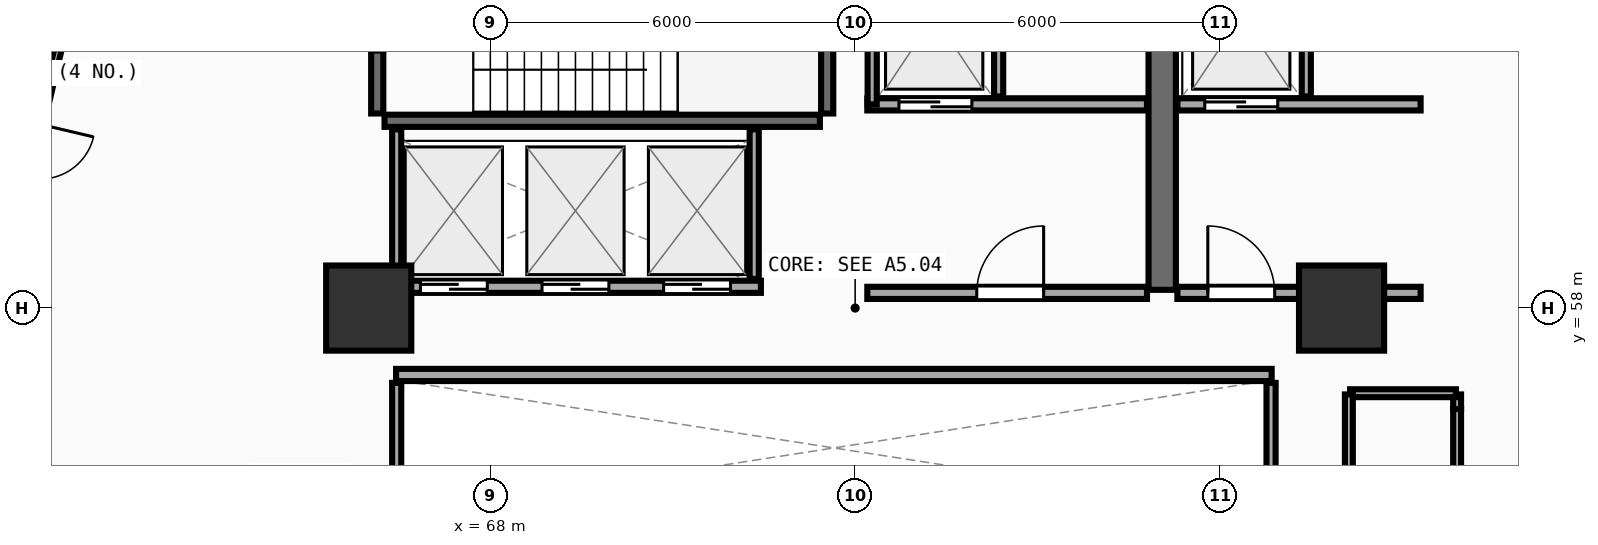
"""IFC4 building model, lengths in metres.
Left out: names, types, materials, properties, quantities, classifications, styles, units other than length and angle.
Written with IfcOpenShell. Run it as: python <this file> out.ifc"""

import sys

from ifc_helpers import new_model, si_unit, direction, frame, frame_2d, origin, origin_2d, place, context, subcontext, project, spatial, rectangle, extrude, element, fill, save


model = new_model("IFC4")
c1 = context("Model", 3, precision=1e-05, world=origin(), true_north=direction((0.0, 1.0)))
c2 = subcontext(c1, "Body", "Model", "MODEL_VIEW")
j1 = project(units=[si_unit("LENGTHUNIT", "METRE"), si_unit("PLANEANGLEUNIT", "RADIAN")], contexts=[c1])
p1 = place(None, origin())
s1 = spatial("IfcSite", under=j1, at=p1, CompositionType="ELEMENT")
p2 = place(p1, origin())
s2 = spatial("IfcBuilding", under=s1, at=p2, CompositionType="ELEMENT")
p3 = place(p2, frame((0.0, 0.0, 18.0)))
s3 = spatial("IfcBuildingStorey", under=s2, at=p3, CompositionType="ELEMENT", Elevation=18.0)
for number, where, z_axis, x_axis in (
    (1, (82.0, 58.0, 0.0), (0.0, 0.0, 1.0), (1.0, 0.0, 0.0)),
    (2, (66.0, 58.0, 0.0), (0.0, 0.0, 1.0), (1.0, 0.0, 0.0)),
):
    element("IfcColumn", number, at=place(p3, frame(where, z_axis=z_axis, x_axis=x_axis)), inside=s3, PredefinedType="PILASTER", context=c2, shape_type="SweptSolid", body=[
        extrude(rectangle(XDim=1.4, YDim=1.4, at=origin_2d()), origin(), (0.0, 0.0, 1.0), 4.5),
    ])
p4 = place(p3, frame((66.26, 61.08, 0.0), z_axis=(0.0, 0.0, 1.0), x_axis=(1.0, 0.0, 0.0)))
e3 = element("IfcWall", 3, at=p4, inside=s3, PredefinedType="SHEAR", context=c2, shape_type="SweptSolid", body=[
    extrude(rectangle(XDim=7.16, YDim=0.2, at=frame_2d((3.58, 0.0))), origin(), (0.0, 0.0, 1.0), 4.24),
])
p5 = place(p3, frame((73.54, 61.2, 0.0), z_axis=(0.0, 0.0, 1.0), x_axis=(0.0, 1.0, 0.0)))
e4 = element("IfcWall", 4, at=p5, inside=s3, PredefinedType="SHEAR", context=c2, shape_type="SweptSolid", body=[
    extrude(rectangle(XDim=3.07, YDim=0.2, at=frame_2d((1.535, 0.0))), origin(), (0.0, 0.0, 1.0), 4.24),
])
p6 = place(p3, frame((66.14, 64.27, 0.0), z_axis=(0.0, 0.0, 1.0), x_axis=(0.0, -1.0, 0.0)))
e5 = element("IfcWall", 5, at=p6, inside=s3, PredefinedType="SHEAR", context=c2, shape_type="SweptSolid", body=[
    extrude(rectangle(XDim=3.07, YDim=0.2, at=frame_2d((1.535, 0.0))), origin(), (0.0, 0.0, 1.0), 4.24),
])
p7 = place(p6, frame((1.01, 0.0, 0.0)))
e6 = element("IfcOpeningElement", 6, at=p7, cuts=e5, PredefinedType="OPENING", context=c2, shape_type="SweptSolid", body=[
    extrude(rectangle(XDim=1.05, YDim=2.1, at=frame_2d((0.525, 1.05))), frame((0.0, 0.11, 0.0), z_axis=(0.0, -1.0, 0.0), x_axis=(1.0, 0.0, 0.0)), (0.0, 0.0, 1.0), 0.22),
])
p8 = place(p3, frame((79.05, 58.3, 0.0), z_axis=(0.0, 0.0, 1.0), x_axis=(0.0, 1.0, 0.0)))
e7 = element("IfcWall", 7, at=p8, inside=s3, PredefinedType="SHEAR", context=c2, shape_type="SweptSolid", body=[
    extrude(rectangle(XDim=6.3, YDim=0.45, at=frame_2d((3.15, 0.0))), origin(), (0.0, 0.0, 1.0), 4.24),
])
p9 = place(p3, frame((74.2, 61.35, 0.0), z_axis=(0.0, 0.0, 1.0), x_axis=(1.0, 0.0, 0.0)))
e8 = element("IfcWall", 8, at=p9, inside=s3, PredefinedType="SOLIDWALL", context=c2, shape_type="SweptSolid", body=[
    extrude(rectangle(XDim=4.6, YDim=0.2, at=frame_2d((2.3, 0.0))), origin(), (0.0, 0.0, 1.0), 4.23),
])
p10 = place(p9, frame((0.52, 0.0, 0.0)))
e9 = element("IfcOpeningElement", 9, at=p10, cuts=e8, PredefinedType="OPENING", context=c2, shape_type="SweptSolid", body=[
    extrude(rectangle(XDim=1.2, YDim=2.15, at=frame_2d((0.6, 1.075))), frame((0.0, 0.11, 0.0), z_axis=(0.0, -1.0, 0.0), x_axis=(1.0, 0.0, 0.0)), (0.0, 0.0, 1.0), 0.22),
])
p11 = place(p3, frame((74.28, 61.35, 0.0), z_axis=(0.0, 0.0, 1.0), x_axis=(0.0, 1.0, 0.0)))
e10 = element("IfcWall", 10, at=p11, inside=s3, PredefinedType="PARTITIONING", context=c2, shape_type="SweptSolid", body=[
    extrude(rectangle(XDim=2.97, YDim=0.15, at=frame_2d((1.485, 0.0))), origin(), (0.0, 0.0, 1.0), 4.23),
])
p12 = place(p3, frame((76.36, 61.48, 0.0), z_axis=(0.0, 0.0, 1.0), x_axis=(0.0, 1.0, 0.0)))
e11 = element("IfcWall", 11, at=p12, inside=s3, PredefinedType="PARTITIONING", context=c2, shape_type="SweptSolid", body=[
    extrude(rectangle(XDim=2.84, YDim=0.15, at=frame_2d((1.42, 0.0))), origin(), (0.0, 0.0, 1.0), 4.23),
])
p13 = place(p3, frame((79.3, 61.35, 0.0), z_axis=(0.0, 0.0, 1.0), x_axis=(1.0, 0.0, 0.0)))
e12 = element("IfcWall", 12, at=p13, inside=s3, PredefinedType="SOLIDWALL", context=c2, shape_type="SweptSolid", body=[
    extrude(rectangle(XDim=4.0, YDim=0.2, at=frame_2d((2.0, 0.0))), origin(), (0.0, 0.0, 1.0), 3.525),
])
p14 = place(p13, frame((0.45, 0.0, 0.0)))
e13 = element("IfcOpeningElement", 13, at=p14, cuts=e12, PredefinedType="OPENING", context=c2, shape_type="SweptSolid", body=[
    extrude(rectangle(XDim=1.2, YDim=2.15, at=frame_2d((0.6, 1.075))), frame((0.0, 0.11, 0.0), z_axis=(0.0, -1.0, 0.0), x_axis=(1.0, 0.0, 0.0)), (0.0, 0.0, 1.0), 0.22),
])
p15 = place(p3, frame((81.42, 61.48, 0.0), z_axis=(0.0, 0.0, 1.0), x_axis=(0.0, 1.0, 0.0)))
e14 = element("IfcWall", 14, at=p15, inside=s3, PredefinedType="PARTITIONING", context=c2, shape_type="SweptSolid", body=[
    extrude(rectangle(XDim=2.84, YDim=0.15, at=frame_2d((1.42, 0.0))), origin(), (0.0, 0.0, 1.0), 4.23),
])
p16 = place(p3, frame((74.2, 58.25, 0.0), z_axis=(0.0, 0.0, 1.0), x_axis=(1.0, 0.0, 0.0)))
e15 = element("IfcWall", 15, at=p16, inside=s3, PredefinedType="SOLIDWALL", context=c2, shape_type="SweptSolid", body=[
    extrude(rectangle(XDim=4.6, YDim=0.2, at=frame_2d((2.3, 0.0))), origin(), (0.0, 0.0, 1.0), 4.23),
])
p17 = place(p16, frame((1.8, 0.0, 0.0)))
e16 = element("IfcOpeningElement", 16, at=p17, cuts=e15, PredefinedType="OPENING", context=c2, shape_type="SweptSolid", body=[
    extrude(rectangle(XDim=1.1, YDim=2.1, at=frame_2d((0.55, 1.05))), frame((0.0, 0.11, 0.0), z_axis=(0.0, -1.0, 0.0), x_axis=(1.0, 0.0, 0.0)), (0.0, 0.0, 1.0), 0.22),
])
p18 = place(p3, frame((79.3, 58.25, 0.0), z_axis=(0.0, 0.0, 1.0), x_axis=(1.0, 0.0, 0.0)))
e17 = element("IfcWall", 17, at=p18, inside=s3, PredefinedType="SOLIDWALL", context=c2, shape_type="SweptSolid", body=[
    extrude(rectangle(XDim=4.0, YDim=0.2, at=frame_2d((2.0, 0.0))), origin(), (0.0, 0.0, 1.0), 3.525),
])
p19 = place(p18, frame((0.5, 0.0, 0.0)))
e18 = element("IfcOpeningElement", 18, at=p19, cuts=e17, PredefinedType="OPENING", context=c2, shape_type="SweptSolid", body=[
    extrude(rectangle(XDim=1.1, YDim=2.1, at=frame_2d((0.55, 1.05))), frame((0.0, 0.11, 0.0), z_axis=(0.0, -1.0, 0.0), x_axis=(1.0, 0.0, 0.0)), (0.0, 0.0, 1.0), 0.22),
])
p20 = place(p3, frame((66.45, 58.35, 0.0), z_axis=(0.0, 0.0, 1.0), x_axis=(1.0, 0.0, 0.0)))
e19 = element("IfcWall", 19, at=p20, inside=s3, PredefinedType="SOLIDWALL", context=c2, shape_type="SweptSolid", body=[
    extrude(rectangle(XDim=6.0, YDim=0.2, at=frame_2d((3.0, 0.0))), origin(), (0.0, 0.0, 1.0), 4.23),
])
p21 = place(p20, frame((0.4, 0.0, 0.0)))
e20 = element("IfcOpeningElement", 20, at=p21, cuts=e19, PredefinedType="OPENING", context=c2, shape_type="SweptSolid", body=[
    extrude(rectangle(XDim=1.1, YDim=2.1, at=frame_2d((0.55, 1.05))), frame((0.0, 0.11, 0.0), z_axis=(0.0, -1.0, 0.0), x_axis=(1.0, 0.0, 0.0)), (0.0, 0.0, 1.0), 0.22),
])
p22 = place(p20, frame((2.4, 0.0, 0.0)))
e21 = element("IfcOpeningElement", 21, at=p22, cuts=e19, PredefinedType="OPENING", context=c2, shape_type="SweptSolid", body=[
    extrude(rectangle(XDim=1.1, YDim=2.1, at=frame_2d((0.55, 1.05))), frame((0.0, 0.11, 0.0), z_axis=(0.0, -1.0, 0.0), x_axis=(1.0, 0.0, 0.0)), (0.0, 0.0, 1.0), 0.22),
])
p23 = place(p20, frame((4.4, 0.0, 0.0)))
e22 = element("IfcOpeningElement", 22, at=p23, cuts=e19, PredefinedType="OPENING", context=c2, shape_type="SweptSolid", body=[
    extrude(rectangle(XDim=1.1, YDim=2.1, at=frame_2d((0.55, 1.05))), frame((0.0, 0.11, 0.0), z_axis=(0.0, -1.0, 0.0), x_axis=(1.0, 0.0, 0.0)), (0.0, 0.0, 1.0), 0.22),
])
for number, where, z_axis, x_axis in (
    (23, (66.46, 58.48, 0.0), (0.0, 0.0, 1.0), (0.0, 1.0, 0.0)),
    (24, (72.34, 58.48, 0.0), (0.0, 0.0, 1.0), (0.0, 1.0, 0.0)),
):
    element("IfcWall", number, at=place(p3, frame(where, z_axis=z_axis, x_axis=x_axis)), inside=s3, PredefinedType="PARTITIONING", context=c2, shape_type="SweptSolid", body=[
        extrude(rectangle(XDim=2.46, YDim=0.15, at=frame_2d((1.23, 0.0))), origin(), (0.0, 0.0, 1.0), 4.23),
    ])
p24 = place(p3, frame((66.45, 56.9, 0.0), z_axis=(0.0, 0.0, 1.0), x_axis=(1.0, 0.0, 0.0)))
e25 = element("IfcWall", 25, at=p24, inside=s3, PredefinedType="SOLIDWALL", context=c2, shape_type="SweptSolid", body=[
    extrude(rectangle(XDim=14.4, YDim=0.2, at=frame_2d((7.2, 0.0))), origin(), (0.0, 0.0, 1.0), 4.23),
])
for number, where, z_axis, x_axis in (
    (26, (66.46, 54.48, 0.0), (0.0, 0.0, 1.0), (0.0, 1.0, 0.0)),
    (27, (80.84, 54.48, 0.0), (0.0, 0.0, 1.0), (0.0, 1.0, 0.0)),
):
    element("IfcWall", number, at=place(p3, frame(where, z_axis=z_axis, x_axis=x_axis)), inside=s3, PredefinedType="PARTITIONING", context=c2, shape_type="SweptSolid", body=[
        extrude(rectangle(XDim=2.29, YDim=0.15, at=frame_2d((1.145, 0.0))), origin(), (0.0, 0.0, 1.0), 4.23),
    ])
p25 = place(p3, frame((83.9, 52.46, 0.0), z_axis=(0.0, 0.0, 1.0), x_axis=(0.0, 1.0, 0.0)))
e28 = element("IfcWall", 28, at=p25, inside=s3, PredefinedType="PLUMBINGWALL", context=c2, shape_type="SweptSolid", body=[
    extrude(rectangle(XDim=3.88, YDim=0.13, at=frame_2d((1.94, 0.0))), origin(), (0.0, 0.0, 1.0), 4.23),
])
p26 = place(p25, frame((1.51, 0.0, 0.0)))
e29 = element("IfcOpeningElement", 29, at=p26, cuts=e28, PredefinedType="OPENING", context=c2, shape_type="SweptSolid", body=[
    extrude(rectangle(XDim=0.86, YDim=2.05, at=frame_2d((0.43, 1.025))), frame((0.0, 0.075, 0.0), z_axis=(0.0, -1.0, 0.0), x_axis=(1.0, 0.0, 0.0)), (0.0, 0.0, 1.0), 0.15),
])
p27 = place(p3, frame((60.987, 62.67, 0.0), z_axis=(0.0, 0.0, 1.0), x_axis=(-0.229728237891, -0.973254815922, 0.0)))
e30 = element("IfcWall", 30, at=p27, inside=s3, PredefinedType="PARTITIONING", context=c2, shape_type="SweptSolid", body=[
    extrude(rectangle(XDim=4.286, YDim=0.12, at=frame_2d((2.143, 0.0))), origin(), (0.0, 0.0, 1.0), 4.23),
])
p28 = place(p27, frame((1.693, 0.0, 0.0)))
e31 = element("IfcOpeningElement", 31, at=p28, cuts=e30, PredefinedType="OPENING", context=c2, shape_type="SweptSolid", body=[
    extrude(rectangle(XDim=0.9, YDim=2.08, at=frame_2d((0.45, 1.04))), frame((0.0, 0.07, 0.0), z_axis=(0.0, -1.0, 0.0), x_axis=(1.0, 0.0, 0.0)), (0.0, 0.0, 1.0), 0.14),
])
p29 = place(p3, frame((83.9, 56.34, 0.0), z_axis=(0.0, 0.0, 1.0), x_axis=(0.0, 1.0, 0.0)))
e32 = element("IfcWall", 32, at=p29, inside=s3, PredefinedType="PLUMBINGWALL", context=c2, shape_type="SweptSolid", body=[
    extrude(rectangle(XDim=0.24, YDim=0.13, at=frame_2d((0.12, 0.0))), origin(), (0.0, 0.0, 1.0), 4.23),
])
p30 = place(p3, frame((83.88, 56.6, 0.0), z_axis=(0.0, 0.0, 1.0), x_axis=(-1.0, 0.0, 0.0)))
e33 = element("IfcWall", 33, at=p30, inside=s3, PredefinedType="PLUMBINGWALL", context=c2, shape_type="SweptSolid", body=[
    extrude(rectangle(XDim=1.74, YDim=0.13, at=frame_2d((0.87, 0.0))), origin(), (0.0, 0.0, 1.0), 3.525),
])
p31 = place(p3, frame((82.12, 56.58, 0.0), z_axis=(0.0, 0.0, 1.0), x_axis=(0.0, -1.0, 0.0)))
e34 = element("IfcWall", 34, at=p31, inside=s3, PredefinedType="PLUMBINGWALL", context=c2, shape_type="SweptSolid", body=[
    extrude(rectangle(XDim=2.31, YDim=0.13, at=frame_2d((1.155, 0.0))), origin(), (0.0, 0.0, 1.0), 3.525),
])
p32 = place(p10, origin())
e35 = element("IfcDoor", 35, at=p32, inside=s3, OperationType="DOUBLE_DOOR_SLIDING", PredefinedType="DOOR", context=c2, shape_type="SweptSolid", body=[
    extrude(rectangle(XDim=1.2, YDim=2.15, at=frame_2d((0.6, 1.075))), frame((0.0, 0.025, 0.0), z_axis=(0.0, -1.0, 0.0), x_axis=(1.0, 0.0, 0.0)), (0.0, 0.0, 1.0), 0.05),
])
fill(e9, e35)
p33 = place(p14, origin())
e36 = element("IfcDoor", 36, at=p33, inside=s3, OperationType="DOUBLE_DOOR_SLIDING", PredefinedType="DOOR", context=c2, shape_type="SweptSolid", body=[
    extrude(rectangle(XDim=1.2, YDim=2.15, at=frame_2d((0.6, 1.075))), frame((0.0, 0.025, 0.0), z_axis=(0.0, -1.0, 0.0), x_axis=(1.0, 0.0, 0.0)), (0.0, 0.0, 1.0), 0.05),
])
fill(e13, e36)
p34 = place(p17, frame((1.1, 0.0, 0.0), z_axis=(0.0, 0.0, 1.0), x_axis=(-1.0, 0.0, 0.0)))
e37 = element("IfcDoor", 37, at=p34, inside=s3, OperationType="SINGLE_SWING_LEFT", PredefinedType="DOOR", context=c2, shape_type="SweptSolid", body=[
    extrude(rectangle(XDim=1.1, YDim=2.1, at=frame_2d((0.55, 1.05))), frame((0.0, 0.025, 0.0), z_axis=(0.0, -1.0, 0.0), x_axis=(1.0, 0.0, 0.0)), (0.0, 0.0, 1.0), 0.05),
])
fill(e16, e37)
p35 = place(p19, frame((1.1, 0.0, 0.0), z_axis=(0.0, 0.0, 1.0), x_axis=(-1.0, 0.0, 0.0)))
e38 = element("IfcDoor", 38, at=p35, inside=s3, OperationType="SINGLE_SWING_RIGHT", PredefinedType="DOOR", context=c2, shape_type="SweptSolid", body=[
    extrude(rectangle(XDim=1.1, YDim=2.1, at=frame_2d((0.55, 1.05))), frame((0.0, 0.025, 0.0), z_axis=(0.0, -1.0, 0.0), x_axis=(1.0, 0.0, 0.0)), (0.0, 0.0, 1.0), 0.05),
])
fill(e18, e38)
p36 = place(p21, origin())
e39 = element("IfcDoor", 39, at=p36, inside=s3, OperationType="DOUBLE_DOOR_SLIDING", PredefinedType="DOOR", context=c2, shape_type="SweptSolid", body=[
    extrude(rectangle(XDim=1.1, YDim=2.1, at=frame_2d((0.55, 1.05))), frame((0.0, 0.025, 0.0), z_axis=(0.0, -1.0, 0.0), x_axis=(1.0, 0.0, 0.0)), (0.0, 0.0, 1.0), 0.05),
])
fill(e20, e39)
p37 = place(p22, origin())
e40 = element("IfcDoor", 40, at=p37, inside=s3, OperationType="DOUBLE_DOOR_SLIDING", PredefinedType="DOOR", context=c2, shape_type="SweptSolid", body=[
    extrude(rectangle(XDim=1.1, YDim=2.1, at=frame_2d((0.55, 1.05))), frame((0.0, 0.025, 0.0), z_axis=(0.0, -1.0, 0.0), x_axis=(1.0, 0.0, 0.0)), (0.0, 0.0, 1.0), 0.05),
])
fill(e21, e40)
p38 = place(p23, origin())
e41 = element("IfcDoor", 41, at=p38, inside=s3, OperationType="DOUBLE_DOOR_SLIDING", PredefinedType="DOOR", context=c2, shape_type="SweptSolid", body=[
    extrude(rectangle(XDim=1.1, YDim=2.1, at=frame_2d((0.55, 1.05))), frame((0.0, 0.025, 0.0), z_axis=(0.0, -1.0, 0.0), x_axis=(1.0, 0.0, 0.0)), (0.0, 0.0, 1.0), 0.05),
])
fill(e22, e41)
save(model, sys.argv[1])
